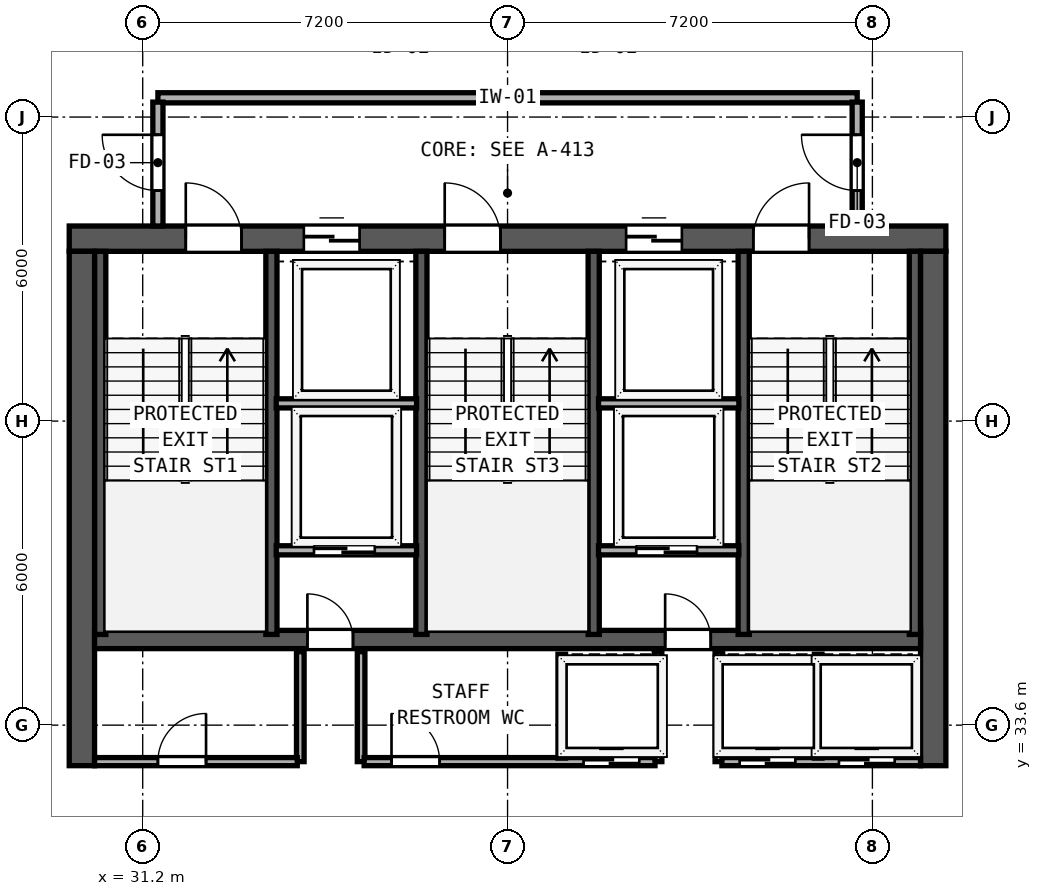
"""IFC4 building model, lengths in metres.
Left out: names, types, materials, properties, quantities, classifications, styles, units other than length and angle.
Written with IfcOpenShell. Run it as: python <this file> out.ifc"""

import sys

from ifc_helpers import new_model, si_unit, direction, frame, frame_2d, origin, place, context, subcontext, project, spatial, rectangle, extrude, element, fill, save


model = new_model("IFC4")
c1 = context("Model", 3, precision=1e-05, world=origin(), true_north=direction((0.0, 1.0)))
c2 = subcontext(c1, "Body", "Model", "MODEL_VIEW")
j1 = project(units=[si_unit("LENGTHUNIT", "METRE"), si_unit("PLANEANGLEUNIT", "RADIAN")], contexts=[c1])
p1 = place(None, origin())
s1 = spatial("IfcSite", under=j1, at=p1, CompositionType="ELEMENT")
p2 = place(p1, origin())
s2 = spatial("IfcBuilding", under=s1, at=p2, CompositionType="ELEMENT")
p3 = place(p2, frame((0.0, 0.0, 254.45)))
s3 = spatial("IfcBuildingStorey", under=s2, at=p3, CompositionType="ELEMENT", Elevation=254.45)
p4 = place(p3, frame((29.75, 43.2, 0.0), z_axis=(0.0, 0.0, 1.0), x_axis=(1.0, 0.0, 0.0)))
e1 = element("IfcWall", 1, at=p4, inside=s3, PredefinedType="SHEAR", context=c2, shape_type="SweptSolid", body=[
    extrude(rectangle(XDim=17.3, YDim=0.5, at=frame_2d((8.65, 0.0))), origin(), (0.0, 0.0, 1.0), 3.67),
])
p5 = place(p4, frame((2.3, 0.0, 0.0)))
e2 = element("IfcOpeningElement", 2, at=p5, cuts=e1, PredefinedType="OPENING", context=c2, shape_type="SweptSolid", body=[
    extrude(rectangle(XDim=1.1, YDim=2.15, at=frame_2d((0.55, 1.075))), frame((0.0, 0.26, 0.0), z_axis=(0.0, -1.0, 0.0), x_axis=(1.0, 0.0, 0.0)), (0.0, 0.0, 1.0), 0.52),
])
p6 = place(p4, frame((7.41, 0.0, 0.0)))
e3 = element("IfcOpeningElement", 3, at=p6, cuts=e1, PredefinedType="OPENING", context=c2, shape_type="SweptSolid", body=[
    extrude(rectangle(XDim=1.1, YDim=2.15, at=frame_2d((0.55, 1.075))), frame((0.0, 0.26, 0.0), z_axis=(0.0, -1.0, 0.0), x_axis=(1.0, 0.0, 0.0)), (0.0, 0.0, 1.0), 0.52),
])
p7 = place(p4, frame((13.5, 0.0, 0.0)))
e4 = element("IfcOpeningElement", 4, at=p7, cuts=e1, PredefinedType="OPENING", context=c2, shape_type="SweptSolid", body=[
    extrude(rectangle(XDim=1.1, YDim=2.15, at=frame_2d((0.55, 1.075))), frame((0.0, 0.26, 0.0), z_axis=(0.0, -1.0, 0.0), x_axis=(1.0, 0.0, 0.0)), (0.0, 0.0, 1.0), 0.52),
])
p8 = place(p4, frame((4.63, 0.0, 0.0)))
e5 = element("IfcOpeningElement", 5, at=p8, cuts=e1, PredefinedType="OPENING", context=c2, shape_type="SweptSolid", body=[
    extrude(rectangle(XDim=1.1, YDim=2.2, at=frame_2d((0.55, 1.1))), frame((0.0, 0.26, 0.0), z_axis=(0.0, -1.0, 0.0), x_axis=(1.0, 0.0, 0.0)), (0.0, 0.0, 1.0), 0.52),
])
p9 = place(p4, frame((10.99, 0.0, 0.0)))
e6 = element("IfcOpeningElement", 6, at=p9, cuts=e1, PredefinedType="OPENING", context=c2, shape_type="SweptSolid", body=[
    extrude(rectangle(XDim=1.1, YDim=2.2, at=frame_2d((0.55, 1.1))), frame((0.0, 0.26, 0.0), z_axis=(0.0, -1.0, 0.0), x_axis=(1.0, 0.0, 0.0)), (0.0, 0.0, 1.0), 0.52),
])
for number, where, z_axis, x_axis in (
    (7, (30.0, 32.8, 0.0), (0.0, 0.0, 1.0), (0.0, 1.0, 0.0)),
    (8, (46.8, 32.8, 0.0), (0.0, 0.0, 1.0), (0.0, 1.0, 0.0)),
):
    element("IfcWall", number, at=place(p3, frame(where, z_axis=z_axis, x_axis=x_axis)), inside=s3, PredefinedType="SHEAR", context=c2, shape_type="SweptSolid", body=[
        extrude(rectangle(XDim=10.15, YDim=0.5, at=frame_2d((5.075, 0.0))), origin(), (0.0, 0.0, 1.0), 3.67),
    ])
p10 = place(p3, frame((30.25, 35.29, 0.0), z_axis=(0.0, 0.0, 1.0), x_axis=(1.0, 0.0, 0.0)))
e9 = element("IfcWall", 9, at=p10, inside=s3, PredefinedType="SHEAR", context=c2, shape_type="SweptSolid", body=[
    extrude(rectangle(XDim=16.3, YDim=0.36, at=frame_2d((8.15, 0.0))), origin(), (0.0, 0.0, 1.0), 3.67),
])
p11 = place(p10, frame((5.1, 0.0, 0.0), z_axis=(0.0, 0.0, 1.0), x_axis=(-1.0, 0.0, 0.0)))
e10 = element("IfcOpeningElement", 10, at=p11, cuts=e9, PredefinedType="OPENING", context=c2, shape_type="SweptSolid", body=[
    extrude(rectangle(XDim=0.9, YDim=2.1, at=frame_2d((0.45, 1.05))), frame((0.0, 0.19, 0.0), z_axis=(0.0, -1.0, 0.0), x_axis=(1.0, 0.0, 0.0)), (0.0, 0.0, 1.0), 0.38),
])
p12 = place(p10, frame((12.16, 0.0, 0.0), z_axis=(0.0, 0.0, 1.0), x_axis=(-1.0, 0.0, 0.0)))
e11 = element("IfcOpeningElement", 11, at=p12, cuts=e9, PredefinedType="OPENING", context=c2, shape_type="SweptSolid", body=[
    extrude(rectangle(XDim=0.9, YDim=2.1, at=frame_2d((0.45, 1.05))), frame((0.0, 0.19, 0.0), z_axis=(0.0, -1.0, 0.0), x_axis=(1.0, 0.0, 0.0)), (0.0, 0.0, 1.0), 0.38),
])
for number, where, z_axis, x_axis in (
    (12, (30.362, 35.39, 0.0), (0.0, 0.0, 1.0), (0.0, 1.0, 0.0)),
    (13, (33.74, 35.39, 0.0), (0.0, 0.0, 1.0), (0.0, 1.0, 0.0)),
    (14, (36.7, 35.39, 0.0), (0.0, 0.0, 1.0), (0.0, 1.0, 0.0)),
    (15, (40.1, 35.39, 0.0), (0.0, 0.0, 1.0), (0.0, 1.0, 0.0)),
    (16, (43.06, 35.39, 0.0), (0.0, 0.0, 1.0), (0.0, 1.0, 0.0)),
    (17, (46.438, 35.39, 0.0), (0.0, 0.0, 1.0), (0.0, 1.0, 0.0)),
):
    element("IfcWall", number, at=place(p3, frame(where, z_axis=z_axis, x_axis=x_axis)), inside=s3, PredefinedType="SHEAR", context=c2, shape_type="SweptSolid", body=[
        extrude(rectangle(XDim=7.56, YDim=0.22, at=frame_2d((3.78, 0.0))), origin(), (0.0, 0.0, 1.0), 3.67),
    ])
p13 = place(p3, frame((31.5, 45.98, 0.0), z_axis=(0.0, 0.0, 1.0), x_axis=(1.0, 0.0, 0.0)))
e18 = element("IfcWall", 18, at=p13, inside=s3, PredefinedType="SOLIDWALL", context=c2, shape_type="SweptSolid", body=[
    extrude(rectangle(XDim=13.8, YDim=0.2, at=frame_2d((6.9, 0.0))), origin(), (0.0, 0.0, 1.0), 3.67),
])
p14 = place(p3, frame((31.5, 43.45, 0.0), z_axis=(0.0, 0.0, 1.0), x_axis=(0.0, 1.0, 0.0)))
e19 = element("IfcWall", 19, at=p14, inside=s3, PredefinedType="SOLIDWALL", context=c2, shape_type="SweptSolid", body=[
    extrude(rectangle(XDim=2.445, YDim=0.2, at=frame_2d((1.223, 0.0))), origin(), (0.0, 0.0, 1.0), 3.67),
])
p15 = place(p14, frame((1.8, 0.0, 0.0), z_axis=(0.0, 0.0, 1.0), x_axis=(-1.0, 0.0, 0.0)))
e20 = element("IfcOpeningElement", 20, at=p15, cuts=e19, PredefinedType="OPENING", context=c2, shape_type="SweptSolid", body=[
    extrude(rectangle(XDim=1.1, YDim=2.15, at=frame_2d((0.55, 1.075))), frame((0.0, 0.11, 0.0), z_axis=(0.0, -1.0, 0.0), x_axis=(1.0, 0.0, 0.0)), (0.0, 0.0, 1.0), 0.22),
])
p16 = place(p3, frame((45.3, 43.45, 0.0), z_axis=(0.0, 0.0, 1.0), x_axis=(0.0, 1.0, 0.0)))
e21 = element("IfcWall", 21, at=p16, inside=s3, PredefinedType="SOLIDWALL", context=c2, shape_type="SweptSolid", body=[
    extrude(rectangle(XDim=2.445, YDim=0.2, at=frame_2d((1.223, 0.0))), origin(), (0.0, 0.0, 1.0), 3.67),
])
p17 = place(p16, frame((0.7, 0.0, 0.0)))
e22 = element("IfcOpeningElement", 22, at=p17, cuts=e21, PredefinedType="OPENING", context=c2, shape_type="SweptSolid", body=[
    extrude(rectangle(XDim=1.1, YDim=2.15, at=frame_2d((0.55, 1.075))), frame((0.0, 0.11, 0.0), z_axis=(0.0, -1.0, 0.0), x_axis=(1.0, 0.0, 0.0)), (0.0, 0.0, 1.0), 0.22),
])
for number, where, z_axis, x_axis in (
    (23, (33.835, 39.95, 0.0), (0.0, 0.0, 1.0), (1.0, 0.0, 0.0)),
    (24, (40.195, 39.95, 0.0), (0.0, 0.0, 1.0), (1.0, 0.0, 0.0)),
):
    element("IfcWall", number, at=place(p3, frame(where, z_axis=z_axis, x_axis=x_axis)), inside=s3, PredefinedType="SOLIDWALL", context=c2, shape_type="SweptSolid", body=[
        extrude(rectangle(XDim=2.77, YDim=0.18, at=frame_2d((1.385, 0.0))), origin(), (0.0, 0.0, 1.0), 3.67),
    ])
p18 = place(p3, frame((33.835, 37.05, 0.0), z_axis=(0.0, 0.0, 1.0), x_axis=(1.0, 0.0, 0.0)))
e25 = element("IfcWall", 25, at=p18, inside=s3, PredefinedType="SOLIDWALL", context=c2, shape_type="SweptSolid", body=[
    extrude(rectangle(XDim=2.77, YDim=0.18, at=frame_2d((1.385, 0.0))), origin(), (0.0, 0.0, 1.0), 3.67),
])
p19 = place(p18, frame((1.945, 0.0, 0.0), z_axis=(0.0, 0.0, 1.0), x_axis=(-1.0, 0.0, 0.0)))
e26 = element("IfcOpeningElement", 26, at=p19, cuts=e25, PredefinedType="OPENING", context=c2, shape_type="SweptSolid", body=[
    extrude(rectangle(XDim=1.2, YDim=2.2, at=frame_2d((0.6, 1.1))), frame((0.0, 0.1, 0.0), z_axis=(0.0, -1.0, 0.0), x_axis=(1.0, 0.0, 0.0)), (0.0, 0.0, 1.0), 0.2),
])
for number, where, z_axis, x_axis in (
    (27, (34.31, 32.88, 0.0), (0.0, 0.0, 1.0), (0.0, 1.0, 0.0)),
    (28, (35.51, 32.88, 0.0), (0.0, 0.0, 1.0), (0.0, 1.0, 0.0)),
):
    element("IfcWall", number, at=place(p3, frame(where, z_axis=z_axis, x_axis=x_axis)), inside=s3, PredefinedType="SOLIDWALL", context=c2, shape_type="SweptSolid", body=[
        extrude(rectangle(XDim=2.17, YDim=0.15, at=frame_2d((1.085, 0.0))), origin(), (0.0, 0.0, 1.0), 3.67),
    ])
p20 = place(p3, frame((40.195, 37.05, 0.0), z_axis=(0.0, 0.0, 1.0), x_axis=(1.0, 0.0, 0.0)))
e29 = element("IfcWall", 29, at=p20, inside=s3, PredefinedType="SOLIDWALL", context=c2, shape_type="SweptSolid", body=[
    extrude(rectangle(XDim=2.77, YDim=0.18, at=frame_2d((1.385, 0.0))), origin(), (0.0, 0.0, 1.0), 3.67),
])
p21 = place(p20, frame((1.945, 0.0, 0.0), z_axis=(0.0, 0.0, 1.0), x_axis=(-1.0, 0.0, 0.0)))
e30 = element("IfcOpeningElement", 30, at=p21, cuts=e29, PredefinedType="OPENING", context=c2, shape_type="SweptSolid", body=[
    extrude(rectangle(XDim=1.2, YDim=2.2, at=frame_2d((0.6, 1.1))), frame((0.0, 0.1, 0.0), z_axis=(0.0, -1.0, 0.0), x_axis=(1.0, 0.0, 0.0)), (0.0, 0.0, 1.0), 0.2),
])
for number, where, z_axis, x_axis in (
    (31, (41.37, 32.88, 0.0), (0.0, 0.0, 1.0), (0.0, 1.0, 0.0)),
    (32, (42.57, 32.88, 0.0), (0.0, 0.0, 1.0), (0.0, 1.0, 0.0)),
):
    element("IfcWall", number, at=place(p3, frame(where, z_axis=z_axis, x_axis=x_axis)), inside=s3, PredefinedType="SOLIDWALL", context=c2, shape_type="SweptSolid", body=[
        extrude(rectangle(XDim=2.17, YDim=0.15, at=frame_2d((1.085, 0.0))), origin(), (0.0, 0.0, 1.0), 3.67),
    ])
p22 = place(p3, frame((30.25, 32.88, 0.0), z_axis=(0.0, 0.0, 1.0), x_axis=(1.0, 0.0, 0.0)))
e33 = element("IfcWall", 33, at=p22, inside=s3, PredefinedType="SOLIDWALL", context=c2, shape_type="SweptSolid", body=[
    extrude(rectangle(XDim=4.0, YDim=0.16, at=frame_2d((2.0, 0.0))), origin(), (0.0, 0.0, 1.0), 3.67),
])
p23 = place(p22, frame((2.2, 0.0, 0.0), z_axis=(0.0, 0.0, 1.0), x_axis=(-1.0, 0.0, 0.0)))
e34 = element("IfcOpeningElement", 34, at=p23, cuts=e33, PredefinedType="OPENING", context=c2, shape_type="SweptSolid", body=[
    extrude(rectangle(XDim=0.95, YDim=2.12, at=frame_2d((0.475, 1.06))), frame((0.0, 0.09, 0.0), z_axis=(0.0, -1.0, 0.0), x_axis=(1.0, 0.0, 0.0)), (0.0, 0.0, 1.0), 0.18),
])
p24 = place(p3, frame((35.57, 32.88, 0.0), z_axis=(0.0, 0.0, 1.0), x_axis=(1.0, 0.0, 0.0)))
e35 = element("IfcWall", 35, at=p24, inside=s3, PredefinedType="SOLIDWALL", context=c2, shape_type="SweptSolid", body=[
    extrude(rectangle(XDim=5.74, YDim=0.16, at=frame_2d((2.87, 0.0))), origin(), (0.0, 0.0, 1.0), 3.67),
])
p25 = place(p24, frame((1.49, 0.0, 0.0), z_axis=(0.0, 0.0, 1.0), x_axis=(-1.0, 0.0, 0.0)))
e36 = element("IfcOpeningElement", 36, at=p25, cuts=e35, PredefinedType="OPENING", context=c2, shape_type="SweptSolid", body=[
    extrude(rectangle(XDim=0.95, YDim=2.12, at=frame_2d((0.475, 1.06))), frame((0.0, 0.09, 0.0), z_axis=(0.0, -1.0, 0.0), x_axis=(1.0, 0.0, 0.0)), (0.0, 0.0, 1.0), 0.18),
])
p26 = place(p24, frame((5.43, 0.0, 0.0), z_axis=(0.0, 0.0, 1.0), x_axis=(-1.0, 0.0, 0.0)))
e37 = element("IfcOpeningElement", 37, at=p26, cuts=e35, PredefinedType="OPENING", context=c2, shape_type="SweptSolid", body=[
    extrude(rectangle(XDim=1.1, YDim=2.2, at=frame_2d((0.55, 1.1))), frame((0.0, 0.09, 0.0), z_axis=(0.0, -1.0, 0.0), x_axis=(1.0, 0.0, 0.0)), (0.0, 0.0, 1.0), 0.18),
])
p27 = place(p3, frame((42.63, 32.88, 0.0), z_axis=(0.0, 0.0, 1.0), x_axis=(1.0, 0.0, 0.0)))
e38 = element("IfcWall", 38, at=p27, inside=s3, PredefinedType="SOLIDWALL", context=c2, shape_type="SweptSolid", body=[
    extrude(rectangle(XDim=3.92, YDim=0.16, at=frame_2d((1.96, 0.0))), origin(), (0.0, 0.0, 1.0), 3.67),
])
p28 = place(p27, frame((1.45, 0.0, 0.0), z_axis=(0.0, 0.0, 1.0), x_axis=(-1.0, 0.0, 0.0)))
e39 = element("IfcOpeningElement", 39, at=p28, cuts=e38, PredefinedType="OPENING", context=c2, shape_type="SweptSolid", body=[
    extrude(rectangle(XDim=1.1, YDim=2.2, at=frame_2d((0.55, 1.1))), frame((0.0, 0.09, 0.0), z_axis=(0.0, -1.0, 0.0), x_axis=(1.0, 0.0, 0.0)), (0.0, 0.0, 1.0), 0.18),
])
p29 = place(p27, frame((3.41, 0.0, 0.0), z_axis=(0.0, 0.0, 1.0), x_axis=(-1.0, 0.0, 0.0)))
e40 = element("IfcOpeningElement", 40, at=p29, cuts=e38, PredefinedType="OPENING", context=c2, shape_type="SweptSolid", body=[
    extrude(rectangle(XDim=1.1, YDim=2.2, at=frame_2d((0.55, 1.1))), frame((0.0, 0.09, 0.0), z_axis=(0.0, -1.0, 0.0), x_axis=(1.0, 0.0, 0.0)), (0.0, 0.0, 1.0), 0.18),
])
for number, where, z_axis, x_axis in (
    (41, (39.47, 32.95, 0.0), (0.0, 0.0, 1.0), (0.0, 1.0, 0.0)),
    (42, (44.53, 32.95, 0.0), (0.0, 0.0, 1.0), (0.0, 1.0, 0.0)),
):
    element("IfcWall", number, at=place(p3, frame(where, z_axis=z_axis, x_axis=x_axis)), inside=s3, PredefinedType="SOLIDWALL", context=c2, shape_type="SweptSolid", body=[
        extrude(rectangle(XDim=2.05, YDim=0.15, at=frame_2d((1.025, 0.0))), origin(), (0.0, 0.0, 1.0), 3.67),
    ])
p30 = place(p5, origin())
e43 = element("IfcDoor", 43, at=p30, inside=s3, OperationType="SINGLE_SWING_LEFT", PredefinedType="DOOR", context=c2, shape_type="SweptSolid", body=[
    extrude(rectangle(XDim=1.1, YDim=2.15, at=frame_2d((0.55, 1.075))), frame((0.0, 0.185, 0.0), z_axis=(0.0, -1.0, 0.0), x_axis=(1.0, 0.0, 0.0)), (0.0, 0.0, 1.0), 0.05),
])
fill(e2, e43)
p31 = place(p6, origin())
e44 = element("IfcDoor", 44, at=p31, inside=s3, OperationType="SINGLE_SWING_LEFT", PredefinedType="DOOR", context=c2, shape_type="SweptSolid", body=[
    extrude(rectangle(XDim=1.1, YDim=2.15, at=frame_2d((0.55, 1.075))), frame((0.0, 0.185, 0.0), z_axis=(0.0, -1.0, 0.0), x_axis=(1.0, 0.0, 0.0)), (0.0, 0.0, 1.0), 0.05),
])
fill(e3, e44)
p32 = place(p7, origin())
e45 = element("IfcDoor", 45, at=p32, inside=s3, OperationType="SINGLE_SWING_RIGHT", PredefinedType="DOOR", context=c2, shape_type="SweptSolid", body=[
    extrude(rectangle(XDim=1.1, YDim=2.15, at=frame_2d((0.55, 1.075))), frame((0.0, 0.185, 0.0), z_axis=(0.0, -1.0, 0.0), x_axis=(1.0, 0.0, 0.0)), (0.0, 0.0, 1.0), 0.05),
])
fill(e4, e45)
p33 = place(p15, origin())
e46 = element("IfcDoor", 46, at=p33, inside=s3, OperationType="SINGLE_SWING_LEFT", PredefinedType="DOOR", context=c2, shape_type="SweptSolid", body=[
    extrude(rectangle(XDim=1.1, YDim=2.15, at=frame_2d((0.55, 1.075))), frame((0.0, 0.025, 0.0), z_axis=(0.0, -1.0, 0.0), x_axis=(1.0, 0.0, 0.0)), (0.0, 0.0, 1.0), 0.05),
])
fill(e20, e46)
p34 = place(p17, origin())
e47 = element("IfcDoor", 47, at=p34, inside=s3, OperationType="SINGLE_SWING_RIGHT", PredefinedType="DOOR", context=c2, shape_type="SweptSolid", body=[
    extrude(rectangle(XDim=1.1, YDim=2.15, at=frame_2d((0.55, 1.075))), frame((0.0, 0.025, 0.0), z_axis=(0.0, -1.0, 0.0), x_axis=(1.0, 0.0, 0.0)), (0.0, 0.0, 1.0), 0.05),
])
fill(e22, e47)
p35 = place(p8, origin())
e48 = element("IfcDoor", 48, at=p35, inside=s3, OperationType="SLIDING_TO_LEFT", PredefinedType="DOOR", context=c2, shape_type="SweptSolid", body=[
    extrude(rectangle(XDim=1.1, YDim=2.2, at=frame_2d((0.55, 1.1))), frame((0.0, 0.185, 0.0), z_axis=(0.0, -1.0, 0.0), x_axis=(1.0, 0.0, 0.0)), (0.0, 0.0, 1.0), 0.05),
])
fill(e5, e48)
p36 = place(p9, origin())
e49 = element("IfcDoor", 49, at=p36, inside=s3, OperationType="SLIDING_TO_LEFT", PredefinedType="DOOR", context=c2, shape_type="SweptSolid", body=[
    extrude(rectangle(XDim=1.1, YDim=2.2, at=frame_2d((0.55, 1.1))), frame((0.0, 0.185, 0.0), z_axis=(0.0, -1.0, 0.0), x_axis=(1.0, 0.0, 0.0)), (0.0, 0.0, 1.0), 0.05),
])
fill(e6, e49)
p37 = place(p19, origin())
e50 = element("IfcDoor", 50, at=p37, inside=s3, OperationType="SLIDING_TO_RIGHT", PredefinedType="DOOR", context=c2, shape_type="SweptSolid", body=[
    extrude(rectangle(XDim=1.2, YDim=2.2, at=frame_2d((0.6, 1.1))), frame((0.0, 0.025, 0.0), z_axis=(0.0, -1.0, 0.0), x_axis=(1.0, 0.0, 0.0)), (0.0, 0.0, 1.0), 0.05),
])
fill(e26, e50)
p38 = place(p11, origin())
e51 = element("IfcDoor", 51, at=p38, inside=s3, OperationType="SINGLE_SWING_RIGHT", PredefinedType="DOOR", context=c2, shape_type="SweptSolid", body=[
    extrude(rectangle(XDim=0.9, YDim=2.1, at=frame_2d((0.45, 1.05))), frame((0.0, 0.025, 0.0), z_axis=(0.0, -1.0, 0.0), x_axis=(1.0, 0.0, 0.0)), (0.0, 0.0, 1.0), 0.05),
])
fill(e10, e51)
p39 = place(p21, origin())
e52 = element("IfcDoor", 52, at=p39, inside=s3, OperationType="SLIDING_TO_RIGHT", PredefinedType="DOOR", context=c2, shape_type="SweptSolid", body=[
    extrude(rectangle(XDim=1.2, YDim=2.2, at=frame_2d((0.6, 1.1))), frame((0.0, 0.025, 0.0), z_axis=(0.0, -1.0, 0.0), x_axis=(1.0, 0.0, 0.0)), (0.0, 0.0, 1.0), 0.05),
])
fill(e30, e52)
p40 = place(p12, origin())
e53 = element("IfcDoor", 53, at=p40, inside=s3, OperationType="SINGLE_SWING_RIGHT", PredefinedType="DOOR", context=c2, shape_type="SweptSolid", body=[
    extrude(rectangle(XDim=0.9, YDim=2.1, at=frame_2d((0.45, 1.05))), frame((0.0, 0.025, 0.0), z_axis=(0.0, -1.0, 0.0), x_axis=(1.0, 0.0, 0.0)), (0.0, 0.0, 1.0), 0.05),
])
fill(e11, e53)
p41 = place(p23, origin())
e54 = element("IfcDoor", 54, at=p41, inside=s3, OperationType="SINGLE_SWING_LEFT", PredefinedType="DOOR", context=c2, shape_type="SweptSolid", body=[
    extrude(rectangle(XDim=0.95, YDim=2.12, at=frame_2d((0.475, 1.06))), frame((0.0, 0.025, 0.0), z_axis=(0.0, -1.0, 0.0), x_axis=(1.0, 0.0, 0.0)), (0.0, 0.0, 1.0), 0.05),
])
fill(e34, e54)
p42 = place(p25, origin())
e55 = element("IfcDoor", 55, at=p42, inside=s3, OperationType="SINGLE_SWING_RIGHT", PredefinedType="DOOR", context=c2, shape_type="SweptSolid", body=[
    extrude(rectangle(XDim=0.95, YDim=2.12, at=frame_2d((0.475, 1.06))), frame((0.0, 0.025, 0.0), z_axis=(0.0, -1.0, 0.0), x_axis=(1.0, 0.0, 0.0)), (0.0, 0.0, 1.0), 0.05),
])
fill(e36, e55)
p43 = place(p26, origin())
e56 = element("IfcDoor", 56, at=p43, inside=s3, OperationType="SLIDING_TO_RIGHT", PredefinedType="DOOR", context=c2, shape_type="SweptSolid", body=[
    extrude(rectangle(XDim=1.1, YDim=2.2, at=frame_2d((0.55, 1.1))), frame((0.0, 0.025, 0.0), z_axis=(0.0, -1.0, 0.0), x_axis=(1.0, 0.0, 0.0)), (0.0, 0.0, 1.0), 0.05),
])
fill(e37, e56)
p44 = place(p28, origin())
e57 = element("IfcDoor", 57, at=p44, inside=s3, OperationType="SLIDING_TO_RIGHT", PredefinedType="DOOR", context=c2, shape_type="SweptSolid", body=[
    extrude(rectangle(XDim=1.1, YDim=2.2, at=frame_2d((0.55, 1.1))), frame((0.0, 0.025, 0.0), z_axis=(0.0, -1.0, 0.0), x_axis=(1.0, 0.0, 0.0)), (0.0, 0.0, 1.0), 0.05),
])
fill(e39, e57)
p45 = place(p29, origin())
e58 = element("IfcDoor", 58, at=p45, inside=s3, OperationType="SLIDING_TO_RIGHT", PredefinedType="DOOR", context=c2, shape_type="SweptSolid", body=[
    extrude(rectangle(XDim=1.1, YDim=2.2, at=frame_2d((0.55, 1.1))), frame((0.0, 0.025, 0.0), z_axis=(0.0, -1.0, 0.0), x_axis=(1.0, 0.0, 0.0)), (0.0, 0.0, 1.0), 0.05),
])
fill(e40, e58)
save(model, sys.argv[1])
